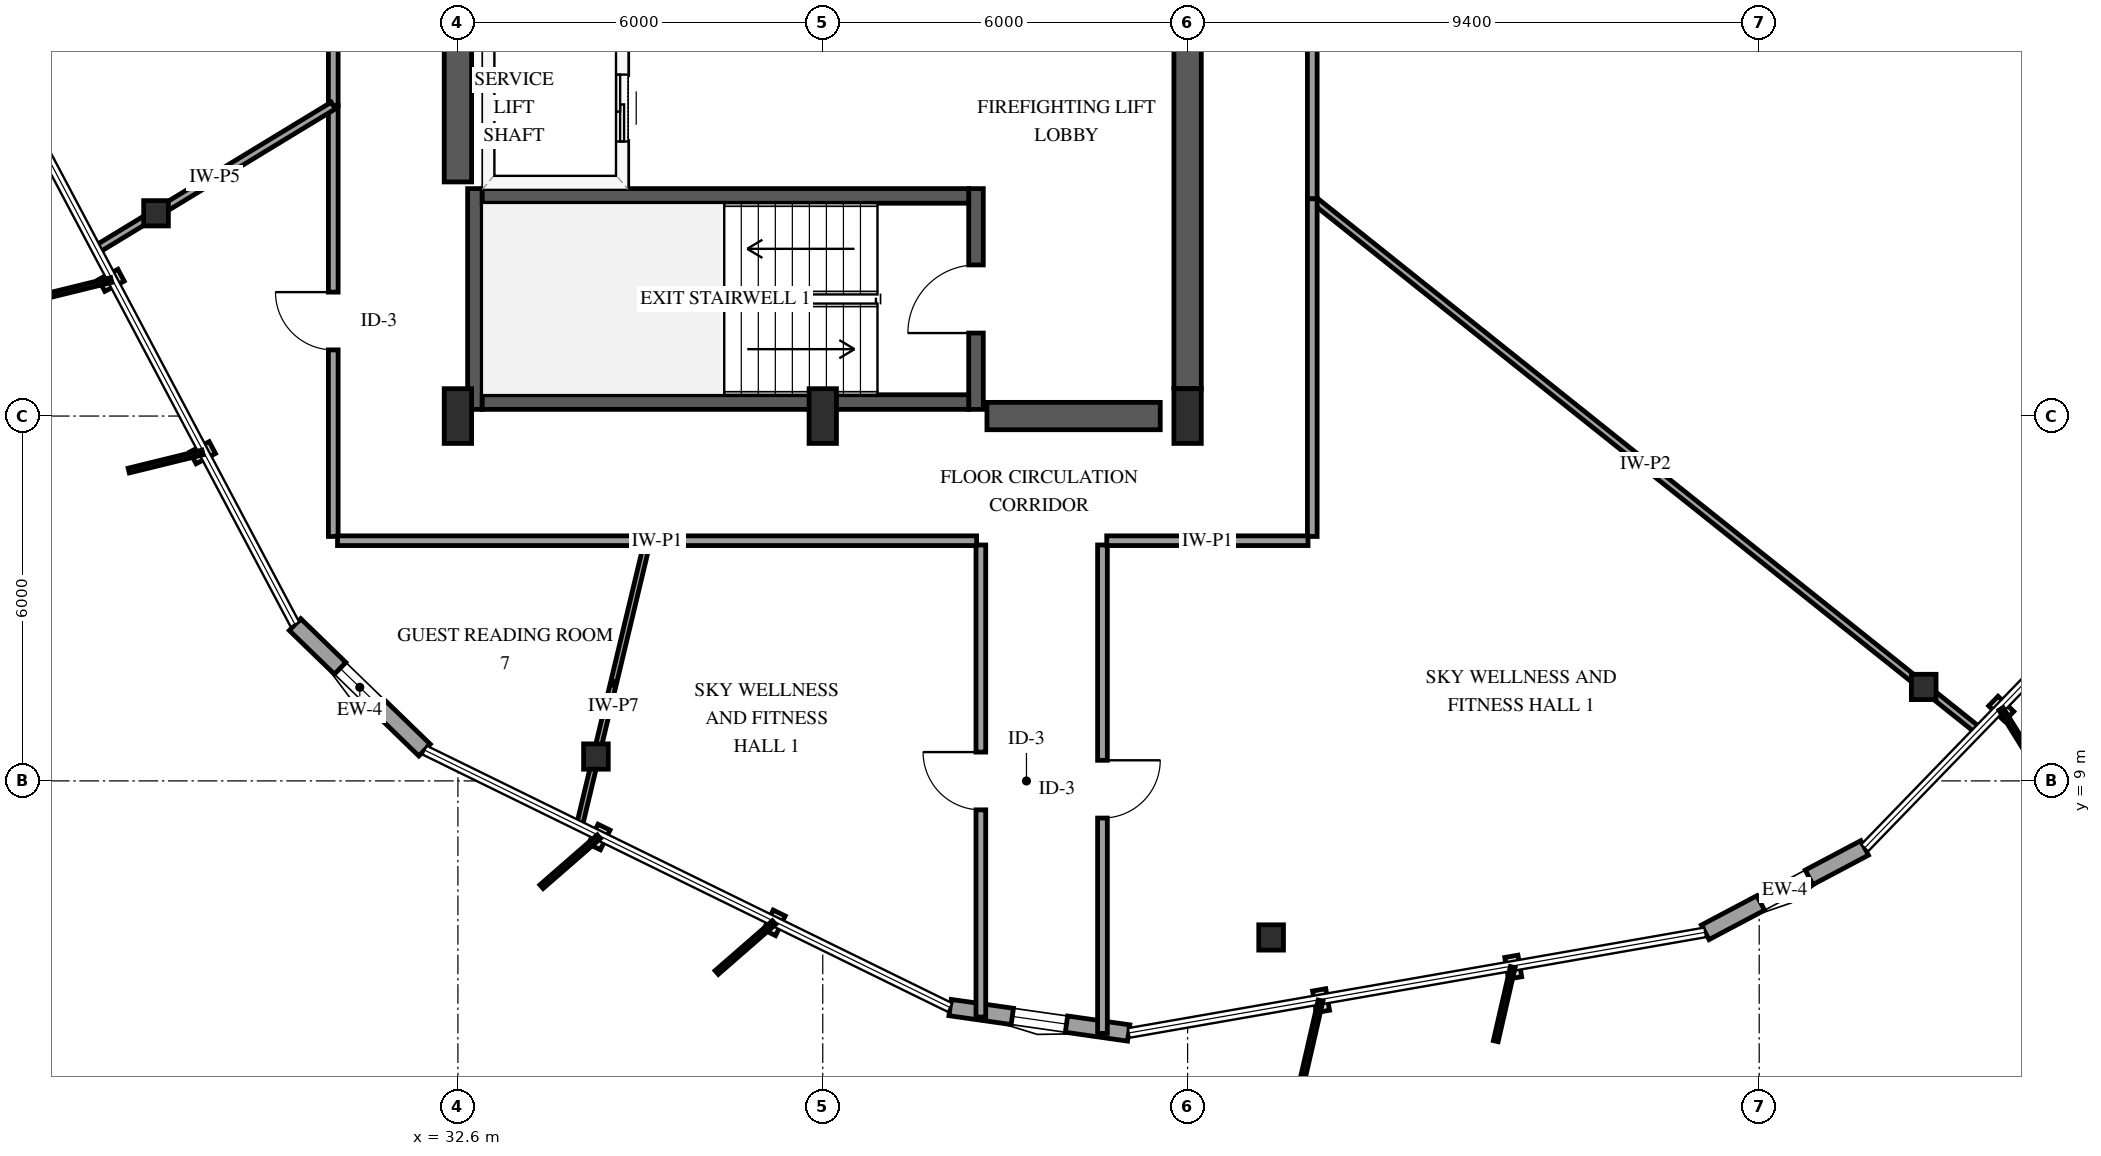
"""IFC4 building model, lengths in metres.
Left out: names, types, materials, properties, quantities, classifications, styles, units other than length and angle.
Written with IfcOpenShell. Run it as: python <this file> out.ifc"""

import sys

from ifc_helpers import new_model, si_unit, direction, frame, frame_2d, origin, origin_2d, place, context, subcontext, project, spatial, rectangle, i_section, extrude, element, fill, save


model = new_model("IFC4")
c1 = context("Model", 3, precision=1e-05, world=origin(), true_north=direction((0.0, 1.0)))
c2 = subcontext(c1, "Body", "Model", "MODEL_VIEW")
j1 = project(units=[si_unit("LENGTHUNIT", "METRE"), si_unit("PLANEANGLEUNIT", "RADIAN")], contexts=[c1])
p1 = place(None, origin())
s1 = spatial("IfcSite", under=j1, at=p1, CompositionType="ELEMENT")
p2 = place(p1, origin())
s2 = spatial("IfcBuilding", under=s1, at=p2, CompositionType="ELEMENT")
p3 = place(p2, frame((0.0, 0.0, 201.4)))
s3 = spatial("IfcBuildingStorey", under=s2, at=p3, CompositionType="ELEMENT", Elevation=201.4)
p4 = place(p3, frame((32.88, 15.11, 0.0), z_axis=(0.0, 0.0, 1.0), x_axis=(0.0, 1.0, 0.0)))
e1 = element("IfcWall", 1, at=p4, inside=s3, PredefinedType="SHEAR", context=c2, shape_type="SweptSolid", body=[
    extrude(rectangle(XDim=3.63, YDim=0.24, at=frame_2d((1.815, 0.0))), origin(), (0.0, 0.0, 1.0), 3.6),
])
p5 = place(p3, frame((41.12, 15.11, 0.0), z_axis=(0.0, 0.0, 1.0), x_axis=(0.0, 1.0, 0.0)))
e2 = element("IfcWall", 2, at=p5, inside=s3, PredefinedType="SHEAR", context=c2, shape_type="SweptSolid", body=[
    extrude(rectangle(XDim=3.63, YDim=0.24, at=frame_2d((1.815, 0.0))), origin(), (0.0, 0.0, 1.0), 3.6),
])
p6 = place(p5, frame((1.255, 0.0, 0.0)))
e3 = element("IfcOpeningElement", 3, at=p6, cuts=e2, PredefinedType="OPENING", context=c2, shape_type="SweptSolid", body=[
    extrude(rectangle(XDim=1.12, YDim=2.15, at=frame_2d((0.56, 1.075))), frame((0.0, 0.13, 0.0), z_axis=(0.0, -1.0, 0.0), x_axis=(1.0, 0.0, 0.0)), (0.0, 0.0, 1.0), 0.26),
])
for number, where, z_axis, x_axis in (
    (4, (33.0, 15.23, 0.0), (0.0, 0.0, 1.0), (1.0, 0.0, 0.0)),
    (5, (33.0, 18.62, 0.0), (0.0, 0.0, 1.0), (1.0, 0.0, 0.0)),
):
    element("IfcWall", number, at=place(p3, frame(where, z_axis=z_axis, x_axis=x_axis)), inside=s3, PredefinedType="SHEAR", context=c2, shape_type="SweptSolid", body=[
        extrude(rectangle(XDim=8.0, YDim=0.24, at=frame_2d((4.0, 0.0))), origin(), (0.0, 0.0, 1.0), 3.6),
    ])
p7 = place(p3, frame((32.6, 18.85, 0.0), z_axis=(0.0, 0.0, 1.0), x_axis=(0.0, 1.0, 0.0)))
e6 = element("IfcWall", 6, at=p7, inside=s3, PredefinedType="SHEAR", context=c2, shape_type="SweptSolid", body=[
    extrude(rectangle(XDim=12.3, YDim=0.45, at=frame_2d((6.15, 0.0))), origin(), (0.0, 0.0, 1.0), 3.6),
])
p8 = place(p3, frame((41.3, 15.0, 0.0), z_axis=(0.0, 0.0, 1.0), x_axis=(1.0, 0.0, 0.0)))
e7 = element("IfcWall", 7, at=p8, inside=s3, PredefinedType="SHEAR", context=c2, shape_type="SweptSolid", body=[
    extrude(rectangle(XDim=2.85, YDim=0.45, at=frame_2d((1.425, 0.0))), origin(), (0.0, 0.0, 1.0), 3.6),
])
p9 = place(p3, frame((44.6, 15.45, 0.0), z_axis=(0.0, 0.0, 1.0), x_axis=(0.0, 1.0, 0.0)))
e8 = element("IfcWall", 8, at=p9, inside=s3, PredefinedType="SHEAR", context=c2, shape_type="SweptSolid", body=[
    extrude(rectangle(XDim=6.35, YDim=0.45, at=frame_2d((3.175, 0.0))), origin(), (0.0, 0.0, 1.0), 3.6),
])
for number, where, z_axis, x_axis in (
    (9, (32.6, 15.0, 0.0), (0.0, 0.0, 1.0), (1.0, 0.0, 0.0)),
    (10, (38.6, 15.0, 0.0), (0.0, 0.0, 1.0), (1.0, 0.0, 0.0)),
    (11, (44.6, 15.0, 0.0), (0.0, 0.0, 1.0), (1.0, 0.0, 0.0)),
):
    element("IfcColumn", number, at=place(p3, frame(where, z_axis=z_axis, x_axis=x_axis)), inside=s3, PredefinedType="PILASTER", context=c2, shape_type="SweptSolid", body=[
        extrude(rectangle(XDim=0.45, YDim=0.9, at=origin_2d()), origin(), (0.0, 0.0, 1.0), 3.6),
    ])
for number, where, z_axis, x_axis in (
    (12, (27.635, 18.334, 0.0), (0.0, 0.0, 1.0), (1.0, 0.0, 0.0)),
    (13, (34.87, 9.401, 0.0), (0.0, 0.0, 1.0), (1.0, 0.0, 0.0)),
    (14, (45.973, 6.426, 0.0), (0.0, 0.0, 1.0), (1.0, 0.0, 0.0)),
    (15, (56.705, 10.545, 0.0), (0.0, 0.0, 1.0), (1.0, 0.0, 0.0)),
):
    element("IfcColumn", number, at=place(p3, frame(where, z_axis=z_axis, x_axis=x_axis)), inside=s3, PredefinedType="COLUMN", context=c2, shape_type="SweptSolid", body=[
        extrude(i_section(OverallWidth=0.406, OverallDepth=0.416, WebThickness=0.03, FlangeThickness=0.048, FilletRadius=0.038, at=origin_2d()), origin(), (0.0, 0.0, 1.0), 3.6),
    ])
p10 = place(p3, frame((29.921, 11.571, 0.0), z_axis=(0.0, 0.0, 1.0), x_axis=(0.718088554482, -0.695951742523, 0.0)))
e16 = element("IfcWall", 16, at=p10, inside=s3, PredefinedType="SOLIDWALL", context=c2, shape_type="SweptSolid", body=[
    extrude(rectangle(XDim=2.967, YDim=0.27, at=frame_2d((1.483, 0.0))), origin(), (0.0, 0.0, 1.0), 2.679),
])
p11 = place(p10, frame((1.033, 0.0, 0.75)))
e17 = element("IfcOpeningElement", 17, at=p11, cuts=e16, PredefinedType="OPENING", context=c2, shape_type="SweptSolid", body=[
    extrude(rectangle(XDim=0.9, YDim=1.5, at=frame_2d((0.45, 0.75))), frame((0.0, 0.145, 0.0), z_axis=(0.0, -1.0, 0.0), x_axis=(1.0, 0.0, 0.0)), (0.0, 0.0, 1.0), 0.29),
])
p12 = place(p3, frame((40.694, 5.273, 0.0), z_axis=(0.0, 0.0, 1.0), x_axis=(0.990025064431, -0.14089134749, 0.0)))
e18 = element("IfcWall", 18, at=p12, inside=s3, PredefinedType="SOLIDWALL", context=c2, shape_type="SweptSolid", body=[
    extrude(rectangle(XDim=2.967, YDim=0.27, at=frame_2d((1.483, 0.0))), origin(), (0.0, 0.0, 1.0), 2.679),
])
p13 = place(p12, frame((1.033, 0.0, 0.75)))
e19 = element("IfcOpeningElement", 19, at=p13, cuts=e18, PredefinedType="OPENING", context=c2, shape_type="SweptSolid", body=[
    extrude(rectangle(XDim=0.9, YDim=1.5, at=frame_2d((0.45, 0.75))), frame((0.0, 0.145, 0.0), z_axis=(0.0, -1.0, 0.0), x_axis=(1.0, 0.0, 0.0)), (0.0, 0.0, 1.0), 0.29),
])
p14 = place(p3, frame((53.112, 6.51, 0.0), z_axis=(0.0, 0.0, 1.0), x_axis=(0.883799927138, 0.467865032664, 0.0)))
e20 = element("IfcWall", 20, at=p14, inside=s3, PredefinedType="SOLIDWALL", context=c2, shape_type="SweptSolid", body=[
    extrude(rectangle(XDim=2.967, YDim=0.27, at=frame_2d((1.483, 0.0))), origin(), (0.0, 0.0, 1.0), 2.679),
])
p15 = place(p14, frame((1.033, 0.0, 0.75)))
e21 = element("IfcOpeningElement", 21, at=p15, cuts=e20, PredefinedType="OPENING", context=c2, shape_type="SweptSolid", body=[
    extrude(rectangle(XDim=0.9, YDim=1.5, at=frame_2d((0.45, 0.75))), frame((0.0, 0.145, 0.0), z_axis=(0.0, -1.0, 0.0), x_axis=(1.0, 0.0, 0.0)), (0.0, 0.0, 1.0), 0.29),
])
p16 = place(p3, frame((35.3, 18.79, 0.0), z_axis=(0.0, 0.0, 1.0), x_axis=(0.0, 1.0, 0.0)))
e22 = element("IfcWall", 22, at=p16, inside=s3, PredefinedType="SOLIDWALL", context=c2, shape_type="SweptSolid", body=[
    extrude(rectangle(XDim=2.55, YDim=0.185, at=frame_2d((1.275, 0.0))), origin(), (0.0, 0.0, 1.0), 3.3),
])
p17 = place(p16, frame((0.725, 0.0, 0.0)))
e23 = element("IfcOpeningElement", 23, at=p17, cuts=e22, PredefinedType="OPENING", context=c2, shape_type="SweptSolid", body=[
    extrude(rectangle(XDim=1.1, YDim=2.15, at=frame_2d((0.55, 1.075))), frame((0.0, 0.103, 0.0), z_axis=(0.0, -1.0, 0.0), x_axis=(1.0, 0.0, 0.0)), (0.0, 0.0, 1.0), 0.205),
])
p18 = place(p3, frame((46.65, 18.573, 0.0), z_axis=(0.0, 0.0, 1.0), x_axis=(0.781500547288, -0.623904555672, 0.0)))
e24 = element("IfcWall", 24, at=p18, inside=s3, PredefinedType="PARTITIONING", context=c2, shape_type="SweptSolid", body=[
    extrude(rectangle(XDim=14.017, YDim=0.12, at=frame_2d((7.008, 0.0))), origin(), (0.0, 0.0, 1.0), 3.3),
])
p19 = place(p3, frame((46.65, 27.258, 0.0), z_axis=(0.0, 0.0, 1.0), x_axis=(0.0, -1.0, 0.0)))
e25 = element("IfcWall", 25, at=p19, inside=s3, PredefinedType="PARTITIONING", context=c2, shape_type="SweptSolid", body=[
    extrude(rectangle(XDim=8.685, YDim=0.16, at=frame_2d((4.343, 0.0))), origin(), (0.0, 0.0, 1.0), 3.3),
])
p20 = place(p19, frame((3.867, 0.0, 0.0)))
e26 = element("IfcOpeningElement", 26, at=p20, cuts=e25, PredefinedType="OPENING", context=c2, shape_type="SweptSolid", body=[
    extrude(rectangle(XDim=0.95, YDim=2.15, at=frame_2d((0.475, 1.075))), frame((0.0, 0.09, 0.0), z_axis=(0.0, -1.0, 0.0), x_axis=(1.0, 0.0, 0.0)), (0.0, 0.0, 1.0), 0.18),
])
p21 = place(p3, frame((30.55, 20.106, 0.0), z_axis=(0.0, 0.0, 1.0), x_axis=(0.0, 1.0, 0.0)))
e27 = element("IfcWall", 27, at=p21, inside=s3, PredefinedType="PARTITIONING", context=c2, shape_type="SweptSolid", body=[
    extrude(rectangle(XDim=8.245, YDim=0.16, at=frame_2d((4.123, 0.0))), origin(), (0.0, 0.0, 1.0), 3.3),
])
p22 = place(p21, frame((3.647, 0.0, 0.0)))
e28 = element("IfcOpeningElement", 28, at=p22, cuts=e27, PredefinedType="OPENING", context=c2, shape_type="SweptSolid", body=[
    extrude(rectangle(XDim=0.95, YDim=2.15, at=frame_2d((0.475, 1.075))), frame((0.0, 0.09, 0.0), z_axis=(0.0, -1.0, 0.0), x_axis=(1.0, 0.0, 0.0)), (0.0, 0.0, 1.0), 0.18),
])
p23 = place(p3, frame((43.2, 12.88, 0.0), z_axis=(0.0, 0.0, 1.0), x_axis=(0.0, -1.0, 0.0)))
e29 = element("IfcWall", 29, at=p23, inside=s3, PredefinedType="PARTITIONING", context=c2, shape_type="SweptSolid", body=[
    extrude(rectangle(XDim=8.032, YDim=0.16, at=frame_2d((4.016, 0.0))), origin(), (0.0, 0.0, 1.0), 2.678),
])
p24 = place(p23, frame((3.541, 0.0, 0.0)))
e30 = element("IfcOpeningElement", 30, at=p24, cuts=e29, PredefinedType="OPENING", context=c2, shape_type="SweptSolid", body=[
    extrude(rectangle(XDim=0.95, YDim=2.15, at=frame_2d((0.475, 1.075))), frame((0.0, 0.09, 0.0), z_axis=(0.0, -1.0, 0.0), x_axis=(1.0, 0.0, 0.0)), (0.0, 0.0, 1.0), 0.18),
])
p25 = place(p3, frame((41.2, 5.117, 0.0), z_axis=(0.0, 0.0, 1.0), x_axis=(0.0, 1.0, 0.0)))
e31 = element("IfcWall", 31, at=p25, inside=s3, PredefinedType="PARTITIONING", context=c2, shape_type="SweptSolid", body=[
    extrude(rectangle(XDim=7.763, YDim=0.16, at=frame_2d((3.881, 0.0))), origin(), (0.0, 0.0, 1.0), 3.3),
])
p26 = place(p25, frame((3.407, 0.0, 0.0)))
e32 = element("IfcOpeningElement", 32, at=p26, cuts=e31, PredefinedType="OPENING", context=c2, shape_type="SweptSolid", body=[
    extrude(rectangle(XDim=0.95, YDim=2.15, at=frame_2d((0.475, 1.075))), frame((0.0, 0.09, 0.0), z_axis=(0.0, -1.0, 0.0), x_axis=(1.0, 0.0, 0.0)), (0.0, 0.0, 1.0), 0.18),
])
p27 = place(p3, frame((30.55, 13.02, 0.0), z_axis=(0.0, 0.0, 1.0), x_axis=(0.0, 1.0, 0.0)))
e33 = element("IfcWall", 33, at=p27, inside=s3, PredefinedType="PARTITIONING", context=c2, shape_type="SweptSolid", body=[
    extrude(rectangle(XDim=7.086, YDim=0.16, at=frame_2d((3.543, 0.0))), origin(), (0.0, 0.0, 1.0), 3.3),
])
p28 = place(p27, frame((3.068, 0.0, 0.0)))
e34 = element("IfcOpeningElement", 34, at=p28, cuts=e33, PredefinedType="OPENING", context=c2, shape_type="SweptSolid", body=[
    extrude(rectangle(XDim=0.95, YDim=2.15, at=frame_2d((0.475, 1.075))), frame((0.0, 0.09, 0.0), z_axis=(0.0, -1.0, 0.0), x_axis=(1.0, 0.0, 0.0)), (0.0, 0.0, 1.0), 0.18),
])
p29 = place(p3, frame((46.65, 18.573, 0.0), z_axis=(0.0, 0.0, 1.0), x_axis=(0.0, -1.0, 0.0)))
e35 = element("IfcWall", 35, at=p29, inside=s3, PredefinedType="PARTITIONING", context=c2, shape_type="SweptSolid", body=[
    extrude(rectangle(XDim=5.553, YDim=0.16, at=frame_2d((2.776, 0.0))), origin(), (0.0, 0.0, 1.0), 3.3),
])
p30 = place(p3, frame((41.13, 12.95, 0.0), z_axis=(0.0, 0.0, 1.0), x_axis=(-1.0, 0.0, 0.0)))
e36 = element("IfcWall", 36, at=p30, inside=s3, PredefinedType="PARTITIONING", context=c2, shape_type="SweptSolid", body=[
    extrude(rectangle(XDim=5.411, YDim=0.16, at=frame_2d((2.706, 0.0))), origin(), (0.0, 0.0, 1.0), 3.3),
])
p31 = place(p3, frame((35.719, 12.95, 0.0), z_axis=(0.0, 0.0, 1.0), x_axis=(-1.0, 0.0, 0.0)))
e37 = element("IfcWall", 37, at=p31, inside=s3, PredefinedType="PARTITIONING", context=c2, shape_type="SweptSolid", body=[
    extrude(rectangle(XDim=5.099, YDim=0.16, at=frame_2d((2.549, 0.0))), origin(), (0.0, 0.0, 1.0), 3.3),
])
p32 = place(p3, frame((35.719, 12.95, 0.0), z_axis=(0.0, 0.0, 1.0), x_axis=(-0.232683564536, -0.972552496678, 0.0)))
e38 = element("IfcWall", 38, at=p32, inside=s3, PredefinedType="PARTITIONING", context=c2, shape_type="SweptSolid", body=[
    extrude(rectangle(XDim=4.822, YDim=0.1, at=frame_2d((2.411, 0.0))), origin(), (0.0, 0.0, 1.0), 2.595),
])
p33 = place(p3, frame((30.55, 20.106, 0.0), z_axis=(0.0, 0.0, 1.0), x_axis=(-0.854582072733, -0.519316359229, 0.0)))
e39 = element("IfcWall", 39, at=p33, inside=s3, PredefinedType="PARTITIONING", context=c2, shape_type="SweptSolid", body=[
    extrude(rectangle(XDim=4.558, YDim=0.13, at=frame_2d((2.279, 0.0))), origin(), (0.0, 0.0, 1.0), 3.3),
])
p34 = place(p3, frame((46.58, 12.95, 0.0), z_axis=(0.0, 0.0, 1.0), x_axis=(-1.0, 0.0, 0.0)))
e40 = element("IfcWall", 40, at=p34, inside=s3, PredefinedType="PARTITIONING", context=c2, shape_type="SweptSolid", body=[
    extrude(rectangle(XDim=3.31, YDim=0.16, at=frame_2d((1.655, 0.0))), origin(), (0.0, 0.0, 1.0), 3.3),
])
p35 = place(p11, origin())
e41 = element("IfcWindow", 41, at=p35, inside=s3, PartitioningType="SINGLE_PANEL", PredefinedType="WINDOW", context=c2, shape_type="SweptSolid", body=[
    extrude(rectangle(XDim=0.9, YDim=1.5, at=frame_2d((0.45, 0.75))), frame((0.0, 0.03, 0.0), z_axis=(0.0, -1.0, 0.0), x_axis=(1.0, 0.0, 0.0)), (0.0, 0.0, 1.0), 0.06),
])
fill(e17, e41)
p36 = place(p13, origin())
e42 = element("IfcWindow", 42, at=p36, inside=s3, PartitioningType="SINGLE_PANEL", PredefinedType="WINDOW", context=c2, shape_type="SweptSolid", body=[
    extrude(rectangle(XDim=0.9, YDim=1.5, at=frame_2d((0.45, 0.75))), frame((0.0, 0.03, 0.0), z_axis=(0.0, -1.0, 0.0), x_axis=(1.0, 0.0, 0.0)), (0.0, 0.0, 1.0), 0.06),
])
fill(e19, e42)
p37 = place(p15, origin())
e43 = element("IfcWindow", 43, at=p37, inside=s3, PartitioningType="SINGLE_PANEL", PredefinedType="WINDOW", context=c2, shape_type="SweptSolid", body=[
    extrude(rectangle(XDim=0.9, YDim=1.5, at=frame_2d((0.45, 0.75))), frame((0.0, 0.03, 0.0), z_axis=(0.0, -1.0, 0.0), x_axis=(1.0, 0.0, 0.0)), (0.0, 0.0, 1.0), 0.06),
])
fill(e21, e43)
p38 = place(p17, origin())
e44 = element("IfcDoor", 44, at=p38, inside=s3, OperationType="SLIDING_TO_LEFT", PredefinedType="DOOR", context=c2, shape_type="SweptSolid", body=[
    extrude(rectangle(XDim=1.1, YDim=2.15, at=frame_2d((0.55, 1.075))), frame((0.0, 0.025, 0.0), z_axis=(0.0, -1.0, 0.0), x_axis=(1.0, 0.0, 0.0)), (0.0, 0.0, 1.0), 0.05),
])
fill(e23, e44)
p39 = place(p6, origin())
e45 = element("IfcDoor", 45, at=p39, inside=s3, OperationType="SINGLE_SWING_LEFT", PredefinedType="DOOR", context=c2, shape_type="SweptSolid", body=[
    extrude(rectangle(XDim=1.12, YDim=2.15, at=frame_2d((0.56, 1.075))), frame((0.0, 0.025, 0.0), z_axis=(0.0, -1.0, 0.0), x_axis=(1.0, 0.0, 0.0)), (0.0, 0.0, 1.0), 0.05),
])
fill(e3, e45)
p40 = place(p24, origin())
e46 = element("IfcDoor", 46, at=p40, inside=s3, OperationType="SINGLE_SWING_LEFT", PredefinedType="DOOR", context=c2, shape_type="SweptSolid", body=[
    extrude(rectangle(XDim=0.95, YDim=2.15, at=frame_2d((0.475, 1.075))), frame((0.0, 0.025, 0.0), z_axis=(0.0, -1.0, 0.0), x_axis=(1.0, 0.0, 0.0)), (0.0, 0.0, 1.0), 0.05),
])
fill(e30, e46)
p41 = place(p26, origin())
e47 = element("IfcDoor", 47, at=p41, inside=s3, OperationType="SINGLE_SWING_RIGHT", PredefinedType="DOOR", context=c2, shape_type="SweptSolid", body=[
    extrude(rectangle(XDim=0.95, YDim=2.15, at=frame_2d((0.475, 1.075))), frame((0.0, 0.025, 0.0), z_axis=(0.0, -1.0, 0.0), x_axis=(1.0, 0.0, 0.0)), (0.0, 0.0, 1.0), 0.05),
])
fill(e32, e47)
p42 = place(p28, origin())
e48 = element("IfcDoor", 48, at=p42, inside=s3, OperationType="SINGLE_SWING_RIGHT", PredefinedType="DOOR", context=c2, shape_type="SweptSolid", body=[
    extrude(rectangle(XDim=0.95, YDim=2.15, at=frame_2d((0.475, 1.075))), frame((0.0, 0.025, 0.0), z_axis=(0.0, -1.0, 0.0), x_axis=(1.0, 0.0, 0.0)), (0.0, 0.0, 1.0), 0.05),
])
fill(e34, e48)
save(model, sys.argv[1])
